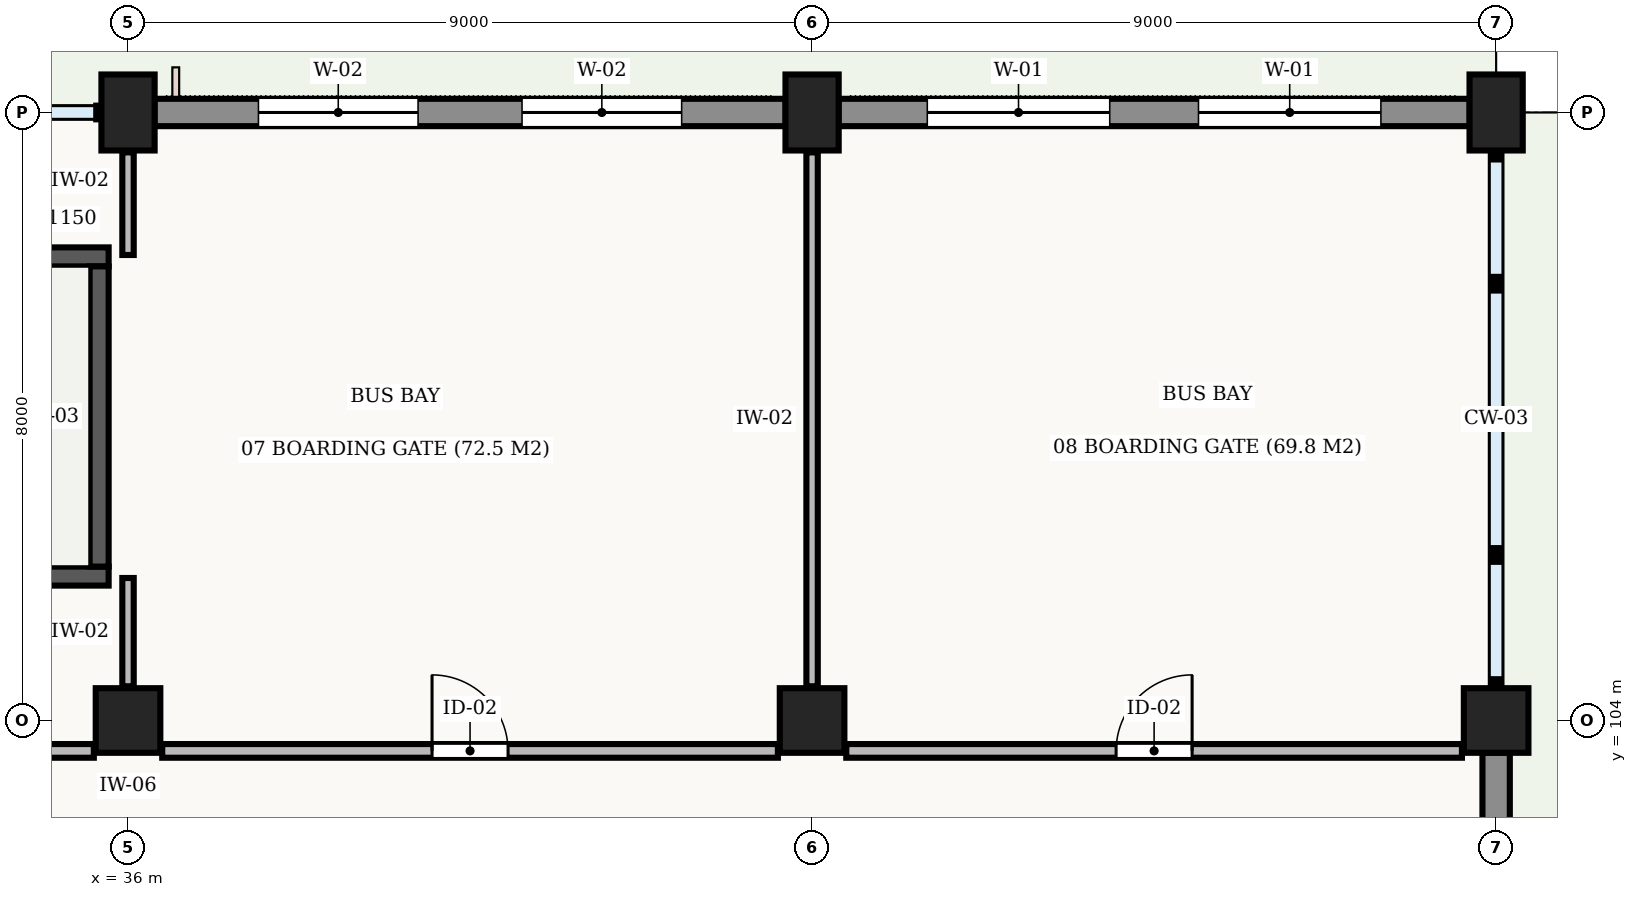
"""IFC4 building model, lengths in metres.
Left out: names, types, materials, properties, quantities, classifications, styles, units other than length and angle.
Written with IfcOpenShell. Run it as: python <this file> out.ifc"""

import sys

from ifc_helpers import new_model, si_unit, direction, frame, frame_2d, origin, origin_2d, place, context, subcontext, project, spatial, rectangle, extrude, element, fill, save


model = new_model("IFC4")
c1 = context("Model", 3, precision=1e-05, world=origin(), true_north=direction((0.0, 1.0)))
c2 = subcontext(c1, "Body", "Model", "MODEL_VIEW")
j1 = project(units=[si_unit("LENGTHUNIT", "METRE"), si_unit("PLANEANGLEUNIT", "RADIAN")], contexts=[c1])
p1 = place(None, origin())
s1 = spatial("IfcSite", under=j1, at=p1, CompositionType="ELEMENT")
p2 = place(p1, origin())
s2 = spatial("IfcBuilding", under=s1, at=p2, CompositionType="ELEMENT")
p3 = place(p2, origin())
s3 = spatial("IfcBuildingStorey", under=s2, at=p3, CompositionType="ELEMENT", Elevation=0.0)
p4 = place(p3, frame((36.0, 104.0, -0.42), z_axis=(0.0, 0.0, 1.0), x_axis=(1.0, 0.0, 0.0)))
e1 = element("IfcColumn", 1, at=p4, inside=s3, PredefinedType="COLUMN", context=c2, shape_type="SweptSolid", body=[
    extrude(rectangle(XDim=0.85, YDim=0.85, at=origin_2d()), origin(), (0.0, 0.0, 1.0), 5.82),
])
p5 = place(p3, frame((36.0, 112.0, -0.42), z_axis=(0.0, 0.0, 1.0), x_axis=(1.0, 0.0, 0.0)))
e2 = element("IfcColumn", 2, at=p5, inside=s3, PredefinedType="COLUMN", context=c2, shape_type="SweptSolid", body=[
    extrude(rectangle(XDim=0.7, YDim=1.0, at=origin_2d()), origin(), (0.0, 0.0, 1.0), 5.82),
])
p6 = place(p3, frame((45.0, 104.0, -0.42), z_axis=(0.0, 0.0, 1.0), x_axis=(1.0, 0.0, 0.0)))
e3 = element("IfcColumn", 3, at=p6, inside=s3, PredefinedType="COLUMN", context=c2, shape_type="SweptSolid", body=[
    extrude(rectangle(XDim=0.85, YDim=0.85, at=origin_2d()), origin(), (0.0, 0.0, 1.0), 5.82),
])
p7 = place(p3, frame((45.0, 112.0, -0.42), z_axis=(0.0, 0.0, 1.0), x_axis=(1.0, 0.0, 0.0)))
e4 = element("IfcColumn", 4, at=p7, inside=s3, PredefinedType="COLUMN", context=c2, shape_type="SweptSolid", body=[
    extrude(rectangle(XDim=0.7, YDim=1.0, at=origin_2d()), origin(), (0.0, 0.0, 1.0), 5.82),
])
p8 = place(p3, frame((54.0, 104.0, -0.42), z_axis=(0.0, 0.0, 1.0), x_axis=(1.0, 0.0, 0.0)))
e5 = element("IfcColumn", 5, at=p8, inside=s3, PredefinedType="COLUMN", context=c2, shape_type="SweptSolid", body=[
    extrude(rectangle(XDim=0.85, YDim=0.85, at=origin_2d()), origin(), (0.0, 0.0, 1.0), 5.82),
])
p9 = place(p3, frame((54.0, 112.0, -0.42), z_axis=(0.0, 0.0, 1.0), x_axis=(1.0, 0.0, 0.0)))
e6 = element("IfcColumn", 6, at=p9, inside=s3, PredefinedType="COLUMN", context=c2, shape_type="SweptSolid", body=[
    extrude(rectangle(XDim=0.7, YDim=1.0, at=origin_2d()), origin(), (0.0, 0.0, 1.0), 5.82),
])
p10 = place(p3, frame((36.348, 112.0, 0.0), z_axis=(0.0, 0.0, 1.0), x_axis=(1.0, 0.0, 0.0)))
e7 = element("IfcWall", 7, at=p10, inside=s3, PredefinedType="STANDARD", context=c2, shape_type="SweptSolid", body=[
    extrude(rectangle(XDim=8.304, YDim=0.36, at=frame_2d((4.152, 0.0))), origin(), (0.0, 0.0, 1.0), 4.38),
])
p11 = place(p10, frame((1.368, 0.0, 0.9)))
e8 = element("IfcOpeningElement", 8, at=p11, cuts=e7, PredefinedType="OPENING", context=c2, shape_type="SweptSolid", body=[
    extrude(rectangle(XDim=2.1, YDim=3.0, at=frame_2d((1.05, 1.5))), frame((0.0, 0.192, 0.0), z_axis=(0.0, -1.0, 0.0), x_axis=(1.0, 0.0, 0.0)), (0.0, 0.0, 1.0), 0.384),
])
p12 = place(p10, frame((4.836, 0.0, 0.9)))
e9 = element("IfcOpeningElement", 9, at=p12, cuts=e7, PredefinedType="OPENING", context=c2, shape_type="SweptSolid", body=[
    extrude(rectangle(XDim=2.1, YDim=3.0, at=frame_2d((1.05, 1.5))), frame((0.0, 0.192, 0.0), z_axis=(0.0, -1.0, 0.0), x_axis=(1.0, 0.0, 0.0)), (0.0, 0.0, 1.0), 0.384),
])
p13 = place(p3, frame((45.348, 112.0, 0.0), z_axis=(0.0, 0.0, 1.0), x_axis=(1.0, 0.0, 0.0)))
e10 = element("IfcWall", 10, at=p13, inside=s3, PredefinedType="STANDARD", context=c2, shape_type="SweptSolid", body=[
    extrude(rectangle(XDim=8.304, YDim=0.36, at=frame_2d((4.152, 0.0))), origin(), (0.0, 0.0, 1.0), 4.38),
])
p14 = place(p13, frame((1.168, 0.0, 0.9)))
e11 = element("IfcOpeningElement", 11, at=p14, cuts=e10, PredefinedType="OPENING", context=c2, shape_type="SweptSolid", body=[
    extrude(rectangle(XDim=2.4, YDim=3.2, at=frame_2d((1.2, 1.6))), frame((0.0, 0.192, 0.0), z_axis=(0.0, -1.0, 0.0), x_axis=(1.0, 0.0, 0.0)), (0.0, 0.0, 1.0), 0.384),
])
p15 = place(p13, frame((4.736, 0.0, 0.9)))
e12 = element("IfcOpeningElement", 12, at=p15, cuts=e10, PredefinedType="OPENING", context=c2, shape_type="SweptSolid", body=[
    extrude(rectangle(XDim=2.4, YDim=3.2, at=frame_2d((1.2, 1.6))), frame((0.0, 0.192, 0.0), z_axis=(0.0, -1.0, 0.0), x_axis=(1.0, 0.0, 0.0)), (0.0, 0.0, 1.0), 0.384),
])
p16 = place(p3, frame((54.0, 103.577, 0.0), z_axis=(0.0, 0.0, 1.0), x_axis=(0.0, -1.0, 0.0)))
e13 = element("IfcWall", 13, at=p16, inside=s3, PredefinedType="STANDARD", context=c2, shape_type="SweptSolid", body=[
    extrude(rectangle(XDim=7.154, YDim=0.36, at=frame_2d((3.577, 0.0))), origin(), (0.0, 0.0, 1.0), 4.38),
])
p17 = place(p16, frame((2.477, 0.0, 0.0)))
e14 = element("IfcOpeningElement", 14, at=p17, cuts=e13, PredefinedType="OPENING", context=c2, shape_type="SweptSolid", body=[
    extrude(rectangle(XDim=2.2, YDim=2.6, at=frame_2d((1.1, 1.3))), frame((0.0, 0.192, 0.0), z_axis=(0.0, -1.0, 0.0), x_axis=(1.0, 0.0, 0.0)), (0.0, 0.0, 1.0), 0.384),
])
p18 = place(p3, frame((27.255, 105.9, 0.0), z_axis=(0.0, 0.0, 1.0), x_axis=(1.0, 0.0, 0.0)))
e15 = element("IfcWall", 15, at=p18, inside=s3, PredefinedType="SHEAR", context=c2, shape_type="SweptSolid", body=[
    extrude(rectangle(XDim=8.49, YDim=0.25, at=frame_2d((4.245, 0.0))), origin(), (0.0, 0.0, 1.0), 5.05),
])
p19 = place(p18, frame((0.405, 0.0, 0.0)))
e16 = element("IfcOpeningElement", 16, at=p19, cuts=e15, PredefinedType="OPENING", context=c2, shape_type="SweptSolid", body=[
    extrude(rectangle(XDim=1.25, YDim=2.15, at=frame_2d((0.625, 1.075))), frame((0.0, 0.137, 0.0), z_axis=(0.0, -1.0, 0.0), x_axis=(1.0, 0.0, 0.0)), (0.0, 0.0, 1.0), 0.274),
])
p20 = place(p3, frame((35.745, 110.1, 0.0), z_axis=(0.0, 0.0, 1.0), x_axis=(-1.0, 0.0, 0.0)))
e17 = element("IfcWall", 17, at=p20, inside=s3, PredefinedType="SHEAR", context=c2, shape_type="SweptSolid", body=[
    extrude(rectangle(XDim=8.49, YDim=0.25, at=frame_2d((4.245, 0.0))), origin(), (0.0, 0.0, 1.0), 5.05),
])
p21 = place(p3, frame((35.62, 106.025, 0.0), z_axis=(0.0, 0.0, 1.0), x_axis=(0.0, 1.0, 0.0)))
e18 = element("IfcWall", 18, at=p21, inside=s3, PredefinedType="SHEAR", context=c2, shape_type="SweptSolid", body=[
    extrude(rectangle(XDim=3.95, YDim=0.25, at=frame_2d((1.975, 0.0))), origin(), (0.0, 0.0, 1.0), 5.05),
])
p22 = place(p3, frame((27.45, 103.6, 0.0), z_axis=(0.0, 0.0, 1.0), x_axis=(1.0, 0.0, 0.0)))
e19 = element("IfcWall", 19, at=p22, inside=s3, PredefinedType="STANDARD", context=c2, shape_type="SweptSolid", body=[
    extrude(rectangle(XDim=8.1, YDim=0.18, at=frame_2d((4.05, 0.0))), origin(), (0.0, 0.0, 1.0), 5.05),
])
p23 = place(p3, frame((36.45, 103.6, 0.0), z_axis=(0.0, 0.0, 1.0), x_axis=(1.0, 0.0, 0.0)))
e20 = element("IfcWall", 20, at=p23, inside=s3, PredefinedType="STANDARD", context=c2, shape_type="SweptSolid", body=[
    extrude(rectangle(XDim=8.1, YDim=0.18, at=frame_2d((4.05, 0.0))), origin(), (0.0, 0.0, 1.0), 5.05),
])
p24 = place(p23, frame((3.55, 0.0, 0.0)))
e21 = element("IfcOpeningElement", 21, at=p24, cuts=e20, PredefinedType="OPENING", context=c2, shape_type="SweptSolid", body=[
    extrude(rectangle(XDim=1.0, YDim=2.1, at=frame_2d((0.5, 1.05))), frame((0.0, 0.102, 0.0), z_axis=(0.0, -1.0, 0.0), x_axis=(1.0, 0.0, 0.0)), (0.0, 0.0, 1.0), 0.204),
])
p25 = place(p3, frame((45.45, 103.6, 0.0), z_axis=(0.0, 0.0, 1.0), x_axis=(1.0, 0.0, 0.0)))
e22 = element("IfcWall", 22, at=p25, inside=s3, PredefinedType="STANDARD", context=c2, shape_type="SweptSolid", body=[
    extrude(rectangle(XDim=8.1, YDim=0.18, at=frame_2d((4.05, 0.0))), origin(), (0.0, 0.0, 1.0), 5.05),
])
p26 = place(p25, frame((3.55, 0.0, 0.0)))
e23 = element("IfcOpeningElement", 23, at=p26, cuts=e22, PredefinedType="OPENING", context=c2, shape_type="SweptSolid", body=[
    extrude(rectangle(XDim=1.0, YDim=2.1, at=frame_2d((0.5, 1.05))), frame((0.0, 0.102, 0.0), z_axis=(0.0, -1.0, 0.0), x_axis=(1.0, 0.0, 0.0)), (0.0, 0.0, 1.0), 0.204),
])
p27 = place(p3, frame((36.0, 104.45, 0.0), z_axis=(0.0, 0.0, 1.0), x_axis=(0.0, 1.0, 0.0)))
e24 = element("IfcWall", 24, at=p27, inside=s3, PredefinedType="STANDARD", context=c2, shape_type="SweptSolid", body=[
    extrude(rectangle(XDim=1.425, YDim=0.15, at=frame_2d((0.712, 0.0))), origin(), (0.0, 0.0, 1.0), 4.33),
])
p28 = place(p3, frame((36.0, 110.125, 0.0), z_axis=(0.0, 0.0, 1.0), x_axis=(0.0, 1.0, 0.0)))
e25 = element("IfcWall", 25, at=p28, inside=s3, PredefinedType="STANDARD", context=c2, shape_type="SweptSolid", body=[
    extrude(rectangle(XDim=1.35, YDim=0.15, at=frame_2d((0.675, 0.0))), origin(), (0.0, 0.0, 1.0), 4.33),
])
p29 = place(p3, frame((45.0, 104.45, 0.0), z_axis=(0.0, 0.0, 1.0), x_axis=(0.0, 1.0, 0.0)))
e26 = element("IfcWall", 26, at=p29, inside=s3, PredefinedType="STANDARD", context=c2, shape_type="SweptSolid", body=[
    extrude(rectangle(XDim=7.025, YDim=0.15, at=frame_2d((3.513, 0.0))), origin(), (0.0, 0.0, 1.0), 4.33),
])
p30 = place(p11, origin())
e27 = element("IfcWindow", 27, at=p30, inside=s3, PartitioningType="SINGLE_PANEL", PredefinedType="WINDOW", context=c2, shape_type="SweptSolid", body=[
    extrude(rectangle(XDim=2.1, YDim=3.0, at=frame_2d((1.05, 1.5))), frame((0.0, 0.03, 0.0), z_axis=(0.0, -1.0, 0.0), x_axis=(1.0, 0.0, 0.0)), (0.0, 0.0, 1.0), 0.06),
])
fill(e8, e27)
p31 = place(p12, origin())
e28 = element("IfcWindow", 28, at=p31, inside=s3, PartitioningType="SINGLE_PANEL", PredefinedType="WINDOW", context=c2, shape_type="SweptSolid", body=[
    extrude(rectangle(XDim=2.1, YDim=3.0, at=frame_2d((1.05, 1.5))), frame((0.0, 0.03, 0.0), z_axis=(0.0, -1.0, 0.0), x_axis=(1.0, 0.0, 0.0)), (0.0, 0.0, 1.0), 0.06),
])
fill(e9, e28)
p32 = place(p14, origin())
e29 = element("IfcWindow", 29, at=p32, inside=s3, PartitioningType="SINGLE_PANEL", PredefinedType="WINDOW", context=c2, shape_type="SweptSolid", body=[
    extrude(rectangle(XDim=2.4, YDim=3.2, at=frame_2d((1.2, 1.6))), frame((0.0, 0.03, 0.0), z_axis=(0.0, -1.0, 0.0), x_axis=(1.0, 0.0, 0.0)), (0.0, 0.0, 1.0), 0.06),
])
fill(e11, e29)
p33 = place(p15, origin())
e30 = element("IfcWindow", 30, at=p33, inside=s3, PartitioningType="SINGLE_PANEL", PredefinedType="WINDOW", context=c2, shape_type="SweptSolid", body=[
    extrude(rectangle(XDim=2.4, YDim=3.2, at=frame_2d((1.2, 1.6))), frame((0.0, 0.03, 0.0), z_axis=(0.0, -1.0, 0.0), x_axis=(1.0, 0.0, 0.0)), (0.0, 0.0, 1.0), 0.06),
])
fill(e12, e30)
p34 = place(p24, origin())
e31 = element("IfcDoor", 31, at=p34, inside=s3, OperationType="SINGLE_SWING_LEFT", PredefinedType="DOOR", context=c2, shape_type="SweptSolid", body=[
    extrude(rectangle(XDim=1.0, YDim=2.1, at=frame_2d((0.5, 1.05))), frame((0.0, 0.025, 0.0), z_axis=(0.0, -1.0, 0.0), x_axis=(1.0, 0.0, 0.0)), (0.0, 0.0, 1.0), 0.05),
])
fill(e21, e31)
p35 = place(p26, origin())
e32 = element("IfcDoor", 32, at=p35, inside=s3, OperationType="SINGLE_SWING_RIGHT", PredefinedType="DOOR", context=c2, shape_type="SweptSolid", body=[
    extrude(rectangle(XDim=1.0, YDim=2.1, at=frame_2d((0.5, 1.05))), frame((0.0, 0.025, 0.0), z_axis=(0.0, -1.0, 0.0), x_axis=(1.0, 0.0, 0.0)), (0.0, 0.0, 1.0), 0.05),
])
fill(e23, e32)
save(model, sys.argv[1])
